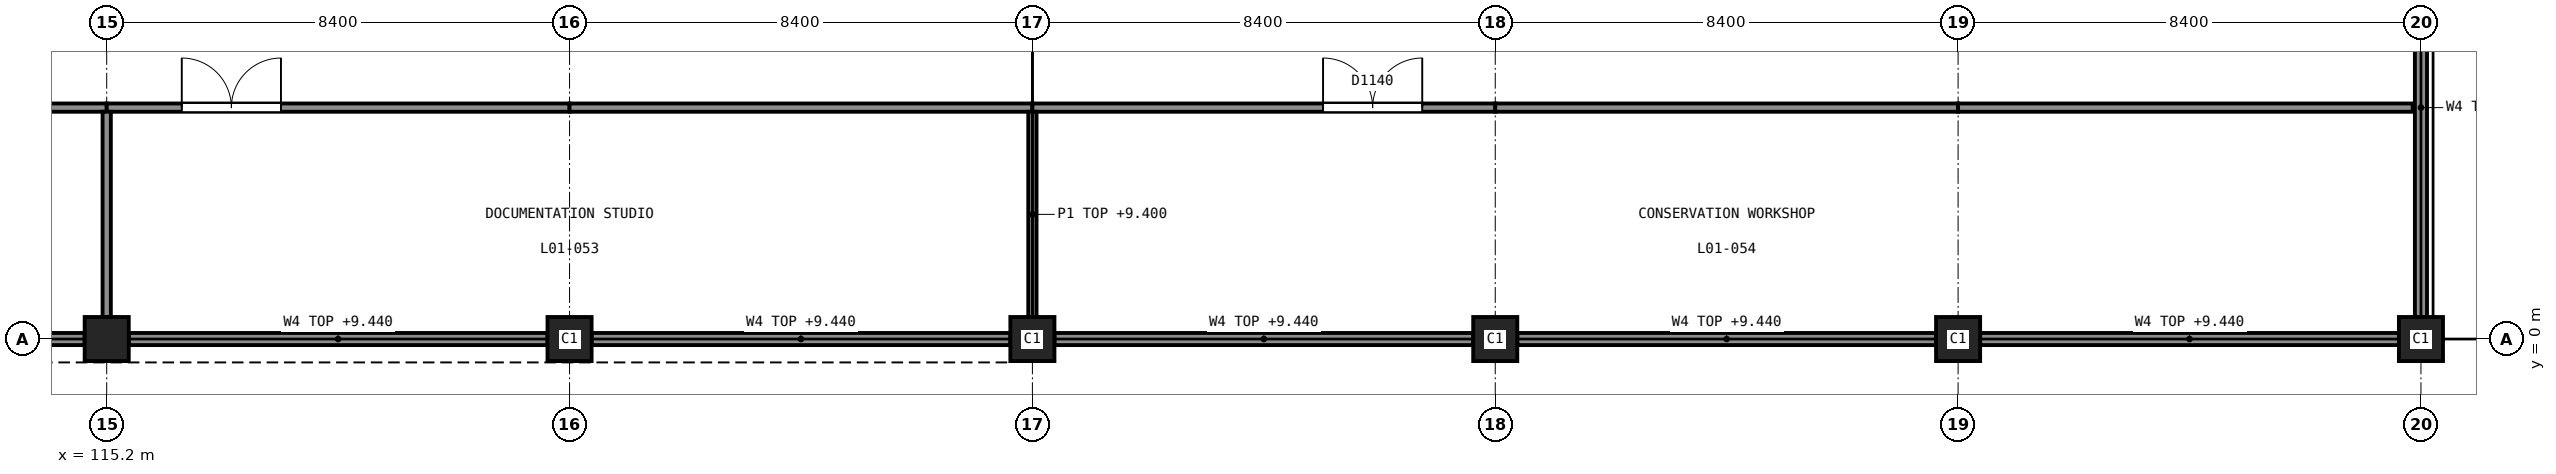
"""IFC4 building model, lengths in metres.
Left out: names, types, materials, properties, quantities, classifications, styles, units other than length and angle.
Written with IfcOpenShell. Run it as: python <this file> out.ifc"""

import sys

from ifc_helpers import new_model, si_unit, direction, frame, frame_2d, origin, origin_2d, place, context, subcontext, project, spatial, rectangle, extrude, element, fill, save


model = new_model("IFC4")
c1 = context("Model", 3, precision=1e-05, world=origin(), true_north=direction((0.0, 1.0)))
c2 = subcontext(c1, "Body", "Model", "MODEL_VIEW")
j1 = project(units=[si_unit("LENGTHUNIT", "METRE"), si_unit("PLANEANGLEUNIT", "RADIAN")], contexts=[c1])
p1 = place(None, origin())
s1 = spatial("IfcSite", under=j1, at=p1, CompositionType="ELEMENT")
p2 = place(p1, origin())
s2 = spatial("IfcBuilding", under=s1, at=p2, CompositionType="ELEMENT")
p3 = place(p2, frame((0.0, 0.0, 5.5)))
s3 = spatial("IfcBuildingStorey", under=s2, at=p3, CompositionType="ELEMENT", Elevation=5.5)
for number, where, z_axis, x_axis in (
    (1, (115.2, 0.0, 0.0), (0.0, 0.0, 1.0), (1.0, 0.0, 0.0)),
    (2, (123.6, 0.0, 0.0), (0.0, 0.0, 1.0), (1.0, 0.0, 0.0)),
    (3, (132.0, 0.0, 0.0), (0.0, 0.0, 1.0), (1.0, 0.0, 0.0)),
    (4, (140.4, 0.0, 0.0), (0.0, 0.0, 1.0), (1.0, 0.0, 0.0)),
    (5, (148.8, 0.0, 0.0), (0.0, 0.0, 1.0), (1.0, 0.0, 0.0)),
    (6, (157.2, 0.0, 0.0), (0.0, 0.0, 1.0), (1.0, 0.0, 0.0)),
):
    element("IfcColumn", number, at=place(p3, frame(where, z_axis=z_axis, x_axis=x_axis)), inside=s3, PredefinedType="COLUMN", context=c2, shape_type="SweptSolid", body=[
        extrude(rectangle(XDim=0.8, YDim=0.8, at=origin_2d()), origin(), (0.0, 0.0, 1.0), 5.0),
    ])
p4 = place(p3, frame((107.2, 0.0, 0.0), z_axis=(0.0, 0.0, 1.0), x_axis=(1.0, 0.0, 0.0)))
e7 = element("IfcWall", 7, at=p4, inside=s3, PredefinedType="SOLIDWALL", context=c2, shape_type="SweptSolid", body=[
    extrude(rectangle(XDim=7.6, YDim=0.22, at=frame_2d((3.8, 0.0))), origin(), (0.0, 0.0, 1.0), 3.94),
])
p5 = place(p3, frame((115.6, 0.0, 0.0), z_axis=(0.0, 0.0, 1.0), x_axis=(1.0, 0.0, 0.0)))
e8 = element("IfcWall", 8, at=p5, inside=s3, PredefinedType="SOLIDWALL", context=c2, shape_type="SweptSolid", body=[
    extrude(rectangle(XDim=7.6, YDim=0.22, at=frame_2d((3.8, 0.0))), origin(), (0.0, 0.0, 1.0), 3.94),
])
for number, where, z_axis, x_axis in (
    (9, (124.0, 0.0, 0.0), (0.0, 0.0, 1.0), (1.0, 0.0, 0.0)),
    (10, (132.4, 0.0, 0.0), (0.0, 0.0, 1.0), (1.0, 0.0, 0.0)),
):
    element("IfcWall", number, at=place(p3, frame(where, z_axis=z_axis, x_axis=x_axis)), inside=s3, PredefinedType="SOLIDWALL", context=c2, shape_type="SweptSolid", body=[
        extrude(rectangle(XDim=7.6, YDim=0.22, at=frame_2d((3.8, 0.0))), origin(), (0.0, 0.0, 1.0), 3.94),
    ])
p6 = place(p3, frame((140.8, 0.0, 0.0), z_axis=(0.0, 0.0, 1.0), x_axis=(1.0, 0.0, 0.0)))
e11 = element("IfcWall", 11, at=p6, inside=s3, PredefinedType="SOLIDWALL", context=c2, shape_type="SweptSolid", body=[
    extrude(rectangle(XDim=7.6, YDim=0.22, at=frame_2d((3.8, 0.0))), origin(), (0.0, 0.0, 1.0), 3.94),
])
for number, where, z_axis, x_axis in (
    (12, (149.2, 0.0, 0.0), (0.0, 0.0, 1.0), (1.0, 0.0, 0.0)),
    (13, (157.2, 0.4, 0.0), (0.0, 0.0, 1.0), (0.0, 1.0, 0.0)),
):
    element("IfcWall", number, at=place(p3, frame(where, z_axis=z_axis, x_axis=x_axis)), inside=s3, PredefinedType="SOLIDWALL", context=c2, shape_type="SweptSolid", body=[
        extrude(rectangle(XDim=7.6, YDim=0.22, at=frame_2d((3.8, 0.0))), origin(), (0.0, 0.0, 1.0), 3.94),
    ])
p7 = place(p3, frame((106.8, 4.2, 0.0), z_axis=(0.0, 0.0, 1.0), x_axis=(1.0, 0.0, 0.0)))
e14 = element("IfcWall", 14, at=p7, inside=s3, PredefinedType="PARTITIONING", context=c2, shape_type="SweptSolid", body=[
    extrude(rectangle(XDim=8.4, YDim=0.15, at=frame_2d((4.2, 0.0))), origin(), (0.0, 0.0, 1.0), 3.9),
])
p8 = place(p3, frame((115.2, 4.2, 0.0), z_axis=(0.0, 0.0, 1.0), x_axis=(1.0, 0.0, 0.0)))
e15 = element("IfcWall", 15, at=p8, inside=s3, PredefinedType="PARTITIONING", context=c2, shape_type="SweptSolid", body=[
    extrude(rectangle(XDim=8.4, YDim=0.15, at=frame_2d((4.2, 0.0))), origin(), (0.0, 0.0, 1.0), 3.9),
])
p9 = place(p8, frame((1.363, 0.0, 0.0)))
e16 = element("IfcOpeningElement", 16, at=p9, cuts=e15, PredefinedType="OPENING", context=c2, shape_type="SweptSolid", body=[
    extrude(rectangle(XDim=1.8, YDim=2.1, at=frame_2d((0.9, 1.05))), frame((0.0, 0.085, 0.0), z_axis=(0.0, -1.0, 0.0), x_axis=(1.0, 0.0, 0.0)), (0.0, 0.0, 1.0), 0.17),
])
p10 = place(p3, frame((123.6, 4.2, 0.0), z_axis=(0.0, 0.0, 1.0), x_axis=(1.0, 0.0, 0.0)))
e17 = element("IfcWall", 17, at=p10, inside=s3, PredefinedType="PARTITIONING", context=c2, shape_type="SweptSolid", body=[
    extrude(rectangle(XDim=8.4, YDim=0.15, at=frame_2d((4.2, 0.0))), origin(), (0.0, 0.0, 1.0), 3.9),
])
p11 = place(p3, frame((132.0, 4.2, 0.0), z_axis=(0.0, 0.0, 1.0), x_axis=(1.0, 0.0, 0.0)))
e18 = element("IfcWall", 18, at=p11, inside=s3, PredefinedType="PARTITIONING", context=c2, shape_type="SweptSolid", body=[
    extrude(rectangle(XDim=8.4, YDim=0.15, at=frame_2d((4.2, 0.0))), origin(), (0.0, 0.0, 1.0), 3.9),
])
p12 = place(p11, frame((5.275, 0.0, 0.0)))
e19 = element("IfcOpeningElement", 19, at=p12, cuts=e18, PredefinedType="OPENING", context=c2, shape_type="SweptSolid", body=[
    extrude(rectangle(XDim=1.8, YDim=2.1, at=frame_2d((0.9, 1.05))), frame((0.0, 0.085, 0.0), z_axis=(0.0, -1.0, 0.0), x_axis=(1.0, 0.0, 0.0)), (0.0, 0.0, 1.0), 0.17),
])
p13 = place(p3, frame((140.4, 4.2, 0.0), z_axis=(0.0, 0.0, 1.0), x_axis=(1.0, 0.0, 0.0)))
e20 = element("IfcWall", 20, at=p13, inside=s3, PredefinedType="PARTITIONING", context=c2, shape_type="SweptSolid", body=[
    extrude(rectangle(XDim=8.4, YDim=0.15, at=frame_2d((4.2, 0.0))), origin(), (0.0, 0.0, 1.0), 3.9),
])
p14 = place(p3, frame((148.8, 4.2, 0.0), z_axis=(0.0, 0.0, 1.0), x_axis=(1.0, 0.0, 0.0)))
e21 = element("IfcWall", 21, at=p14, inside=s3, PredefinedType="PARTITIONING", context=c2, shape_type="SweptSolid", body=[
    extrude(rectangle(XDim=8.25, YDim=0.15, at=frame_2d((4.125, 0.0))), origin(), (0.0, 0.0, 1.0), 3.9),
])
for number, where, z_axis, x_axis in (
    (22, (115.2, 0.4, 0.0), (0.0, 0.0, 1.0), (0.0, 1.0, 0.0)),
    (23, (132.0, 0.4, 0.0), (0.0, 0.0, 1.0), (0.0, 1.0, 0.0)),
):
    element("IfcWall", number, at=place(p3, frame(where, z_axis=z_axis, x_axis=x_axis)), inside=s3, PredefinedType="PARTITIONING", context=c2, shape_type="SweptSolid", body=[
        extrude(rectangle(XDim=3.725, YDim=0.15, at=frame_2d((1.863, 0.0))), origin(), (0.0, 0.0, 1.0), 3.9),
    ])
p15 = place(p9, origin())
e24 = element("IfcDoor", 24, at=p15, inside=s3, OperationType="DOUBLE_DOOR_SINGLE_SWING", PredefinedType="DOOR", context=c2, shape_type="SweptSolid", body=[
    extrude(rectangle(XDim=1.8, YDim=2.1, at=frame_2d((0.9, 1.05))), frame((0.0, 0.025, 0.0), z_axis=(0.0, -1.0, 0.0), x_axis=(1.0, 0.0, 0.0)), (0.0, 0.0, 1.0), 0.05),
])
fill(e16, e24)
p16 = place(p12, origin())
e25 = element("IfcDoor", 25, at=p16, inside=s3, OperationType="DOUBLE_DOOR_SINGLE_SWING", PredefinedType="DOOR", context=c2, shape_type="SweptSolid", body=[
    extrude(rectangle(XDim=1.8, YDim=2.1, at=frame_2d((0.9, 1.05))), frame((0.0, 0.025, 0.0), z_axis=(0.0, -1.0, 0.0), x_axis=(1.0, 0.0, 0.0)), (0.0, 0.0, 1.0), 0.05),
])
fill(e19, e25)
save(model, sys.argv[1])
